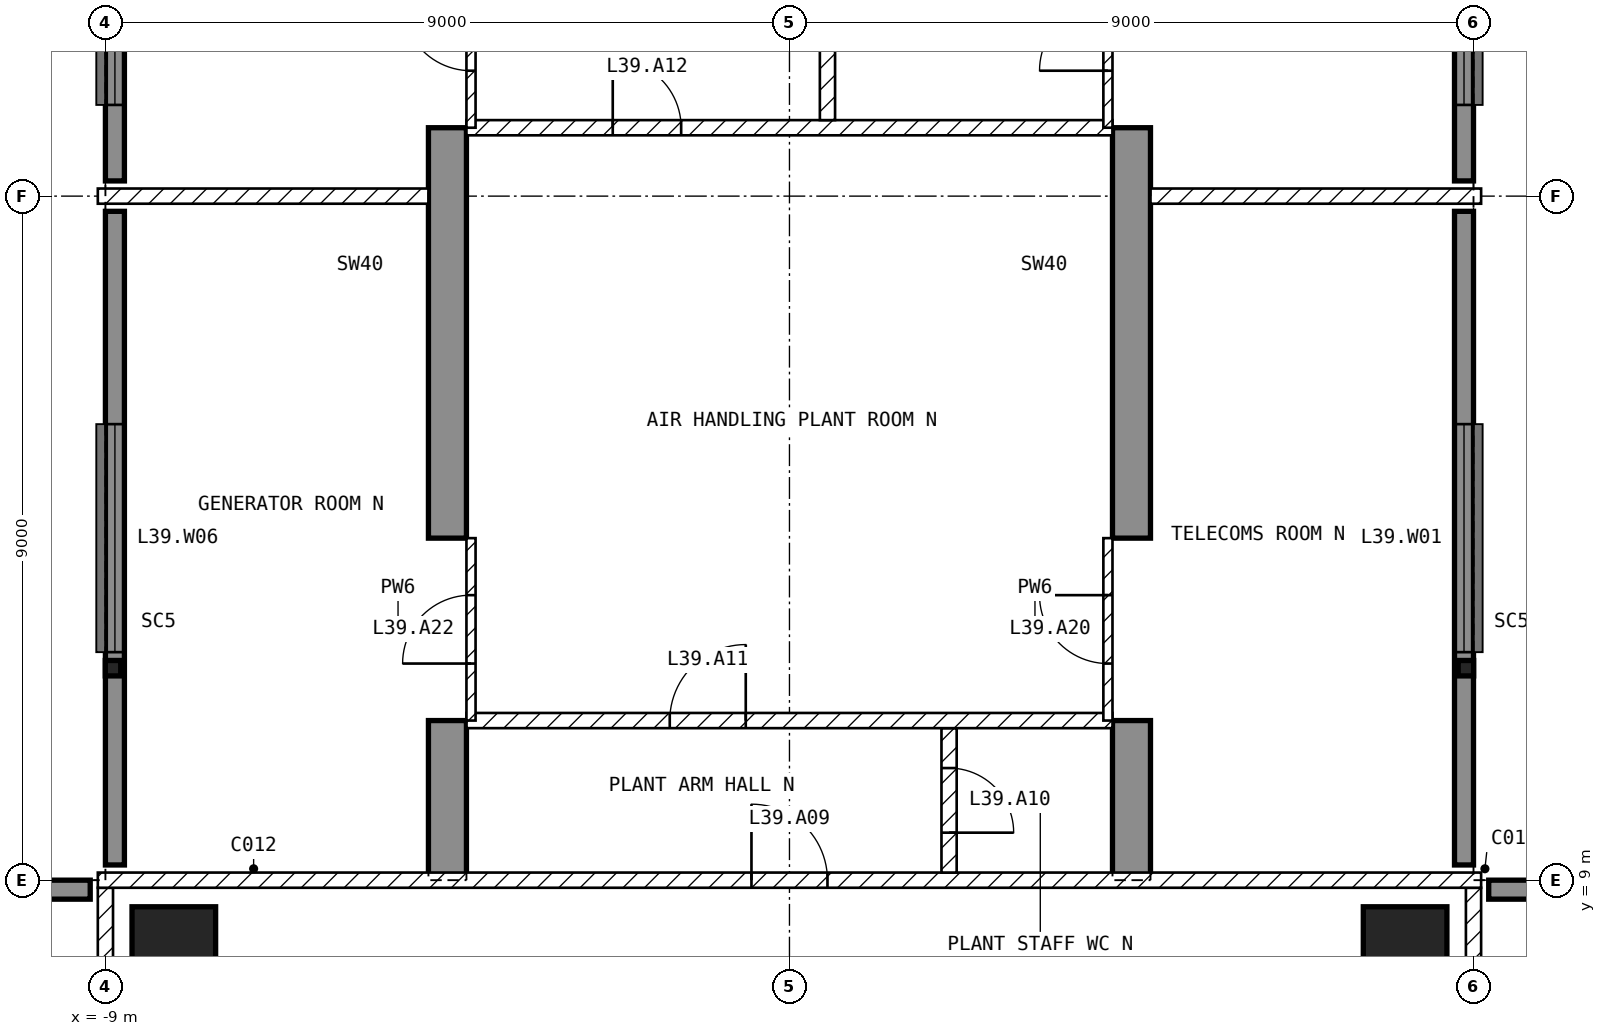
"""IFC4 building model, lengths in metres.
Left out: names, types, materials, properties, quantities, classifications, styles, units other than length and angle.
Written with IfcOpenShell. Run it as: python <this file> out.ifc"""

import sys

from ifc_helpers import new_model, si_unit, direction, frame, frame_2d, origin, origin_2d, place, context, subcontext, project, spatial, polyline, rectangle, hollow_rectangle, outline, extrude, element, fill, save


model = new_model("IFC4")
c1 = context("Model", 3, precision=1e-05, world=origin(), true_north=direction((0.0, 1.0)))
c2 = subcontext(c1, "Body", "Model", "MODEL_VIEW")
j1 = project(units=[si_unit("LENGTHUNIT", "METRE"), si_unit("PLANEANGLEUNIT", "RADIAN")], contexts=[c1])
p1 = place(None, origin())
s1 = spatial("IfcSite", under=j1, at=p1, CompositionType="ELEMENT")
p2 = place(p1, origin())
s2 = spatial("IfcBuilding", under=s1, at=p2, CompositionType="ELEMENT")
p3 = place(p2, frame((0.0, 0.0, 162.1)))
s3 = spatial("IfcBuildingStorey", under=s2, at=p3, CompositionType="ELEMENT", Elevation=162.1)
for number, where, z_axis, x_axis in (
    (1, (-8.1, 8.1, -0.45), (0.0, 0.0, 1.0), (1.0, 0.0, 0.0)),
    (2, (8.1, 8.1, -0.45), (0.0, 0.0, 1.0), (1.0, 0.0, 0.0)),
):
    element("IfcColumn", number, at=place(p3, frame(where, z_axis=z_axis, x_axis=x_axis)), inside=s3, PredefinedType="COLUMN", context=c2, shape_type="SweptSolid", body=[
        extrude(rectangle(XDim=1.1, YDim=1.1, at=origin_2d()), origin(), (0.0, 0.0, 1.0), 4.7),
    ])
for number, where, z_axis, x_axis in (
    (3, (-4.75, 9.0, -0.45), (1.0, 0.0, 0.0), (0.0, 1.0, 0.0)),
    (4, (4.25, 9.0, -0.45), (1.0, 0.0, 0.0), (0.0, 1.0, 0.0)),
):
    element("IfcWall", number, at=place(p3, frame(where, z_axis=z_axis, x_axis=x_axis)), inside=s3, PredefinedType="SHEAR", context=c2, shape_type="SweptSolid", body=[
        extrude(outline(polyline([(0.0, 0.0), (2.1, 0.0), (2.1, 2.85), (4.5, 2.85), (4.5, 0.0), (9.9, 0.0), (9.9, 2.85), (12.3, 2.85), (12.3, 0.0), (16.2, 0.0), (16.2, 4.7), (0.0, 4.7), (0.0, 0.0)])), origin(), (0.0, 0.0, 1.0), 0.5),
    ])
p4 = place(p3, frame((17.8, 8.875, 0.0), z_axis=(0.0, 0.0, 1.0), x_axis=(-1.0, 0.0, 0.0)))
e5 = element("IfcWall", 5, at=p4, inside=s3, PredefinedType="SOLIDWALL", context=c2, shape_type="SweptSolid", body=[
    extrude(rectangle(XDim=8.6, YDim=0.25, at=frame_2d((4.3, 0.0))), origin(), (0.0, 0.0, 1.0), 4.25),
])
p5 = place(p3, frame((8.875, 9.2, 0.0), z_axis=(0.0, 0.0, 1.0), x_axis=(0.0, 1.0, 0.0)))
e6 = element("IfcWall", 6, at=p5, inside=s3, PredefinedType="SOLIDWALL", context=c2, shape_type="SweptSolid", body=[
    extrude(rectangle(XDim=8.6, YDim=0.25, at=frame_2d((4.3, 0.0))), origin(), (0.0, 0.0, 1.0), 4.25),
])
p6 = place(p5, frame((2.8, 0.0, 1.0)))
e7 = element("IfcOpeningElement", 7, at=p6, cuts=e6, PredefinedType="OPENING", context=c2, shape_type="SweptSolid", body=[
    extrude(rectangle(XDim=3.0, YDim=2.4, at=frame_2d((1.5, 1.2))), frame((0.0, 0.135, 0.0), z_axis=(0.0, -1.0, 0.0), x_axis=(1.0, 0.0, 0.0)), (0.0, 0.0, 1.0), 0.27),
])
p7 = place(p3, frame((8.875, 18.2, 0.0), z_axis=(0.0, 0.0, 1.0), x_axis=(0.0, 1.0, 0.0)))
e8 = element("IfcWall", 8, at=p7, inside=s3, PredefinedType="SOLIDWALL", context=c2, shape_type="SweptSolid", body=[
    extrude(rectangle(XDim=5.0, YDim=0.25, at=frame_2d((2.5, 0.0))), origin(), (0.0, 0.0, 1.0), 4.25),
])
p8 = place(p7, frame((1.0, 0.0, 1.0)))
e9 = element("IfcOpeningElement", 9, at=p8, cuts=e8, PredefinedType="OPENING", context=c2, shape_type="SweptSolid", body=[
    extrude(rectangle(XDim=3.0, YDim=2.4, at=frame_2d((1.5, 1.2))), frame((0.0, 0.135, 0.0), z_axis=(0.0, -1.0, 0.0), x_axis=(1.0, 0.0, 0.0)), (0.0, 0.0, 1.0), 0.27),
])
p9 = place(p3, frame((-8.875, 23.2, 0.0), z_axis=(0.0, 0.0, 1.0), x_axis=(0.0, -1.0, 0.0)))
e10 = element("IfcWall", 10, at=p9, inside=s3, PredefinedType="SOLIDWALL", context=c2, shape_type="SweptSolid", body=[
    extrude(rectangle(XDim=5.0, YDim=0.25, at=frame_2d((2.5, 0.0))), origin(), (0.0, 0.0, 1.0), 4.25),
])
p10 = place(p9, frame((1.0, 0.0, 1.0)))
e11 = element("IfcOpeningElement", 11, at=p10, cuts=e10, PredefinedType="OPENING", context=c2, shape_type="SweptSolid", body=[
    extrude(rectangle(XDim=3.0, YDim=2.4, at=frame_2d((1.5, 1.2))), frame((0.0, 0.135, 0.0), z_axis=(0.0, -1.0, 0.0), x_axis=(1.0, 0.0, 0.0)), (0.0, 0.0, 1.0), 0.27),
])
p11 = place(p3, frame((-8.875, 17.8, 0.0), z_axis=(0.0, 0.0, 1.0), x_axis=(0.0, -1.0, 0.0)))
e12 = element("IfcWall", 12, at=p11, inside=s3, PredefinedType="SOLIDWALL", context=c2, shape_type="SweptSolid", body=[
    extrude(rectangle(XDim=8.6, YDim=0.25, at=frame_2d((4.3, 0.0))), origin(), (0.0, 0.0, 1.0), 4.25),
])
p12 = place(p11, frame((2.8, 0.0, 1.0)))
e13 = element("IfcOpeningElement", 13, at=p12, cuts=e12, PredefinedType="OPENING", context=c2, shape_type="SweptSolid", body=[
    extrude(rectangle(XDim=3.0, YDim=2.4, at=frame_2d((1.5, 1.2))), frame((0.0, 0.135, 0.0), z_axis=(0.0, -1.0, 0.0), x_axis=(1.0, 0.0, 0.0)), (0.0, 0.0, 1.0), 0.27),
])
p13 = place(p3, frame((-9.2, 8.875, 0.0), z_axis=(0.0, 0.0, 1.0), x_axis=(-1.0, 0.0, 0.0)))
e14 = element("IfcWall", 14, at=p13, inside=s3, PredefinedType="SOLIDWALL", context=c2, shape_type="SweptSolid", body=[
    extrude(rectangle(XDim=8.6, YDim=0.25, at=frame_2d((4.3, 0.0))), origin(), (0.0, 0.0, 1.0), 4.25),
])
for number, where, z_axis, x_axis in (
    (15, (-8.9, 11.789, 0.0), (0.0, 0.0, 1.0), (1.0, 0.0, 0.0)),
    (16, (8.9, 11.789, 0.0), (0.0, 0.0, 1.0), (1.0, 0.0, 0.0)),
):
    element("IfcColumn", number, at=place(p3, frame(where, z_axis=z_axis, x_axis=x_axis)), inside=s3, PredefinedType="COLUMN", context=c2, shape_type="SweptSolid", body=[
        extrude(hollow_rectangle(XDim=0.203, YDim=0.203, WallThickness=0.01, at=origin_2d()), origin(), (0.0, 0.0, 1.0), 4.25),
    ])
for number, where, z_axis, x_axis in (
    (17, (9.0, 8.9, 0.0), (0.0, 0.0, 1.0), (0.0, -1.0, 0.0)),
    (18, (-9.0, 1.3, 0.0), (0.0, 0.0, 1.0), (0.0, 1.0, 0.0)),
):
    element("IfcWall", number, at=place(p3, frame(where, z_axis=z_axis, x_axis=x_axis)), inside=s3, PredefinedType="PARTITIONING", context=c2, shape_type="SweptSolid", body=[
        extrude(rectangle(XDim=7.6, YDim=0.2, at=frame_2d((3.8, 0.0))), origin(), (0.0, 0.0, 1.0), 4.25),
    ])
p14 = place(p3, frame((-9.1, 9.0, 0.0), z_axis=(0.0, 0.0, 1.0), x_axis=(1.0, 0.0, 0.0)))
e19 = element("IfcWall", 19, at=p14, inside=s3, PredefinedType="PARTITIONING", context=c2, shape_type="SweptSolid", body=[
    extrude(rectangle(XDim=18.2, YDim=0.2, at=frame_2d((9.1, 0.0))), origin(), (0.0, 0.0, 1.0), 4.25),
])
p15 = place(p14, frame((8.6, 0.0, 0.0)))
e20 = element("IfcOpeningElement", 20, at=p15, cuts=e19, PredefinedType="OPENING", context=c2, shape_type="SweptSolid", body=[
    extrude(rectangle(XDim=1.0, YDim=2.1, at=frame_2d((0.5, 1.05))), frame((0.0, 0.11, 0.0), z_axis=(0.0, -1.0, 0.0), x_axis=(1.0, 0.0, 0.0)), (0.0, 0.0, 1.0), 0.22),
])
p16 = place(p3, frame((2.1, 11.0, 0.0), z_axis=(0.0, 0.0, 1.0), x_axis=(0.0, -1.0, 0.0)))
e21 = element("IfcWall", 21, at=p16, inside=s3, PredefinedType="PARTITIONING", context=c2, shape_type="SweptSolid", body=[
    extrude(rectangle(XDim=1.9, YDim=0.2, at=frame_2d((0.95, 0.0))), origin(), (0.0, 0.0, 1.0), 4.25),
])
p17 = place(p16, frame((0.525, 0.0, 0.0)))
e22 = element("IfcOpeningElement", 22, at=p17, cuts=e21, PredefinedType="OPENING", context=c2, shape_type="SweptSolid", body=[
    extrude(rectangle(XDim=0.85, YDim=2.1, at=frame_2d((0.425, 1.05))), frame((0.0, 0.11, 0.0), z_axis=(0.0, -1.0, 0.0), x_axis=(1.0, 0.0, 0.0)), (0.0, 0.0, 1.0), 0.22),
])
p18 = place(p3, frame((-4.25, 11.1, 0.0), z_axis=(0.0, 0.0, 1.0), x_axis=(1.0, 0.0, 0.0)))
e23 = element("IfcWall", 23, at=p18, inside=s3, PredefinedType="PARTITIONING", context=c2, shape_type="SweptSolid", body=[
    extrude(rectangle(XDim=8.5, YDim=0.2, at=frame_2d((4.25, 0.0))), origin(), (0.0, 0.0, 1.0), 4.25),
])
p19 = place(p18, frame((2.675, 0.0, 0.0)))
e24 = element("IfcOpeningElement", 24, at=p19, cuts=e23, PredefinedType="OPENING", context=c2, shape_type="SweptSolid", body=[
    extrude(rectangle(XDim=1.0, YDim=2.1, at=frame_2d((0.5, 1.05))), frame((0.0, 0.11, 0.0), z_axis=(0.0, -1.0, 0.0), x_axis=(1.0, 0.0, 0.0)), (0.0, 0.0, 1.0), 0.22),
])
p20 = place(p3, frame((-4.25, 18.9, 0.0), z_axis=(0.0, 0.0, 1.0), x_axis=(1.0, 0.0, 0.0)))
e25 = element("IfcWall", 25, at=p20, inside=s3, PredefinedType="PARTITIONING", context=c2, shape_type="SweptSolid", body=[
    extrude(rectangle(XDim=8.5, YDim=0.2, at=frame_2d((4.25, 0.0))), origin(), (0.0, 0.0, 1.0), 4.25),
])
p21 = place(p20, frame((1.925, 0.0, 0.0)))
e26 = element("IfcOpeningElement", 26, at=p21, cuts=e25, PredefinedType="OPENING", context=c2, shape_type="SweptSolid", body=[
    extrude(rectangle(XDim=0.9, YDim=2.1, at=frame_2d((0.45, 1.05))), frame((0.0, 0.11, 0.0), z_axis=(0.0, -1.0, 0.0), x_axis=(1.0, 0.0, 0.0)), (0.0, 0.0, 1.0), 0.22),
])
p22 = place(p3, frame((0.5, 23.3, 0.0), z_axis=(0.0, 0.0, 1.0), x_axis=(0.0, -1.0, 0.0)))
e27 = element("IfcWall", 27, at=p22, inside=s3, PredefinedType="PARTITIONING", context=c2, shape_type="SweptSolid", body=[
    extrude(rectangle(XDim=4.3, YDim=0.2, at=frame_2d((2.15, 0.0))), origin(), (0.0, 0.0, 1.0), 4.25),
])
p23 = place(p22, frame((1.7, 0.0, 0.0)))
e28 = element("IfcOpeningElement", 28, at=p23, cuts=e27, PredefinedType="OPENING", context=c2, shape_type="SweptSolid", body=[
    extrude(rectangle(XDim=0.9, YDim=2.1, at=frame_2d((0.45, 1.05))), frame((0.0, 0.11, 0.0), z_axis=(0.0, -1.0, 0.0), x_axis=(1.0, 0.0, 0.0)), (0.0, 0.0, 1.0), 0.22),
])
for number, where, z_axis, x_axis in (
    (29, (4.75, 18.0, 0.0), (0.0, 0.0, 1.0), (1.0, 0.0, 0.0)),
    (30, (-9.1, 18.0, 0.0), (0.0, 0.0, 1.0), (1.0, 0.0, 0.0)),
):
    element("IfcWall", number, at=place(p3, frame(where, z_axis=z_axis, x_axis=x_axis)), inside=s3, PredefinedType="PARTITIONING", context=c2, shape_type="SweptSolid", body=[
        extrude(rectangle(XDim=4.35, YDim=0.2, at=frame_2d((2.175, 0.0))), origin(), (0.0, 0.0, 1.0), 4.25),
    ])
p24 = place(p3, frame((4.19, 11.1, 0.0), z_axis=(0.0, 0.0, 1.0), x_axis=(0.0, 1.0, 0.0)))
e31 = element("IfcWall", 31, at=p24, inside=s3, PredefinedType="PARTITIONING", context=c2, shape_type="SweptSolid", body=[
    extrude(rectangle(XDim=2.4, YDim=0.12, at=frame_2d((1.2, 0.0))), origin(), (0.0, 0.0, 1.0), 2.4),
])
p25 = place(p24, frame((0.75, 0.0, 0.0)))
e32 = element("IfcOpeningElement", 32, at=p25, cuts=e31, PredefinedType="OPENING", context=c2, shape_type="SweptSolid", body=[
    extrude(rectangle(XDim=0.9, YDim=2.1, at=frame_2d((0.45, 1.05))), frame((0.0, 0.07, 0.0), z_axis=(0.0, -1.0, 0.0), x_axis=(1.0, 0.0, 0.0)), (0.0, 0.0, 1.0), 0.14),
])
p26 = place(p3, frame((4.19, 18.9, 0.0), z_axis=(0.0, 0.0, 1.0), x_axis=(0.0, 1.0, 0.0)))
e33 = element("IfcWall", 33, at=p26, inside=s3, PredefinedType="PARTITIONING", context=c2, shape_type="SweptSolid", body=[
    extrude(rectangle(XDim=2.4, YDim=0.12, at=frame_2d((1.2, 0.0))), origin(), (0.0, 0.0, 1.0), 2.4),
])
p27 = place(p26, frame((0.75, 0.0, 0.0)))
e34 = element("IfcOpeningElement", 34, at=p27, cuts=e33, PredefinedType="OPENING", context=c2, shape_type="SweptSolid", body=[
    extrude(rectangle(XDim=0.9, YDim=2.1, at=frame_2d((0.45, 1.05))), frame((0.0, 0.07, 0.0), z_axis=(0.0, -1.0, 0.0), x_axis=(1.0, 0.0, 0.0)), (0.0, 0.0, 1.0), 0.14),
])
p28 = place(p3, frame((-4.19, 11.1, 0.0), z_axis=(0.0, 0.0, 1.0), x_axis=(0.0, 1.0, 0.0)))
e35 = element("IfcWall", 35, at=p28, inside=s3, PredefinedType="PARTITIONING", context=c2, shape_type="SweptSolid", body=[
    extrude(rectangle(XDim=2.4, YDim=0.12, at=frame_2d((1.2, 0.0))), origin(), (0.0, 0.0, 1.0), 2.4),
])
p29 = place(p28, frame((0.75, 0.0, 0.0)))
e36 = element("IfcOpeningElement", 36, at=p29, cuts=e35, PredefinedType="OPENING", context=c2, shape_type="SweptSolid", body=[
    extrude(rectangle(XDim=0.9, YDim=2.1, at=frame_2d((0.45, 1.05))), frame((0.0, 0.07, 0.0), z_axis=(0.0, -1.0, 0.0), x_axis=(1.0, 0.0, 0.0)), (0.0, 0.0, 1.0), 0.14),
])
p30 = place(p3, frame((-4.19, 18.9, 0.0), z_axis=(0.0, 0.0, 1.0), x_axis=(0.0, 1.0, 0.0)))
e37 = element("IfcWall", 37, at=p30, inside=s3, PredefinedType="PARTITIONING", context=c2, shape_type="SweptSolid", body=[
    extrude(rectangle(XDim=2.4, YDim=0.12, at=frame_2d((1.2, 0.0))), origin(), (0.0, 0.0, 1.0), 2.4),
])
p31 = place(p30, frame((0.75, 0.0, 0.0)))
e38 = element("IfcOpeningElement", 38, at=p31, cuts=e37, PredefinedType="OPENING", context=c2, shape_type="SweptSolid", body=[
    extrude(rectangle(XDim=0.9, YDim=2.1, at=frame_2d((0.45, 1.05))), frame((0.0, 0.07, 0.0), z_axis=(0.0, -1.0, 0.0), x_axis=(1.0, 0.0, 0.0)), (0.0, 0.0, 1.0), 0.14),
])
p32 = place(p6, origin())
e39 = element("IfcWindow", 39, at=p32, inside=s3, PartitioningType="SINGLE_PANEL", PredefinedType="WINDOW", context=c2, shape_type="SweptSolid", body=[
    extrude(rectangle(XDim=3.0, YDim=2.4, at=frame_2d((1.5, 1.2))), frame((0.0, 0.03, 0.0), z_axis=(0.0, -1.0, 0.0), x_axis=(1.0, 0.0, 0.0)), (0.0, 0.0, 1.0), 0.06),
])
fill(e7, e39)
p33 = place(p8, origin())
e40 = element("IfcWindow", 40, at=p33, inside=s3, PartitioningType="SINGLE_PANEL", PredefinedType="WINDOW", context=c2, shape_type="SweptSolid", body=[
    extrude(rectangle(XDim=3.0, YDim=2.4, at=frame_2d((1.5, 1.2))), frame((0.0, 0.03, 0.0), z_axis=(0.0, -1.0, 0.0), x_axis=(1.0, 0.0, 0.0)), (0.0, 0.0, 1.0), 0.06),
])
fill(e9, e40)
p34 = place(p10, origin())
e41 = element("IfcWindow", 41, at=p34, inside=s3, PartitioningType="SINGLE_PANEL", PredefinedType="WINDOW", context=c2, shape_type="SweptSolid", body=[
    extrude(rectangle(XDim=3.0, YDim=2.4, at=frame_2d((1.5, 1.2))), frame((0.0, 0.03, 0.0), z_axis=(0.0, -1.0, 0.0), x_axis=(1.0, 0.0, 0.0)), (0.0, 0.0, 1.0), 0.06),
])
fill(e11, e41)
p35 = place(p12, origin())
e42 = element("IfcWindow", 42, at=p35, inside=s3, PartitioningType="SINGLE_PANEL", PredefinedType="WINDOW", context=c2, shape_type="SweptSolid", body=[
    extrude(rectangle(XDim=3.0, YDim=2.4, at=frame_2d((1.5, 1.2))), frame((0.0, 0.03, 0.0), z_axis=(0.0, -1.0, 0.0), x_axis=(1.0, 0.0, 0.0)), (0.0, 0.0, 1.0), 0.06),
])
fill(e13, e42)
p36 = place(p15, origin())
e43 = element("IfcDoor", 43, at=p36, inside=s3, OperationType="SINGLE_SWING_LEFT", PredefinedType="DOOR", context=c2, shape_type="SweptSolid", body=[
    extrude(rectangle(XDim=1.0, YDim=2.1, at=frame_2d((0.5, 1.05))), frame((0.0, 0.025, 0.0), z_axis=(0.0, -1.0, 0.0), x_axis=(1.0, 0.0, 0.0)), (0.0, 0.0, 1.0), 0.05),
])
fill(e20, e43)
p37 = place(p17, origin())
e44 = element("IfcDoor", 44, at=p37, inside=s3, OperationType="SINGLE_SWING_RIGHT", PredefinedType="DOOR", context=c2, shape_type="SweptSolid", body=[
    extrude(rectangle(XDim=0.85, YDim=2.1, at=frame_2d((0.425, 1.05))), frame((0.0, 0.025, 0.0), z_axis=(0.0, -1.0, 0.0), x_axis=(1.0, 0.0, 0.0)), (0.0, 0.0, 1.0), 0.05),
])
fill(e22, e44)
p38 = place(p19, origin())
e45 = element("IfcDoor", 45, at=p38, inside=s3, OperationType="SINGLE_SWING_RIGHT", PredefinedType="DOOR", context=c2, shape_type="SweptSolid", body=[
    extrude(rectangle(XDim=1.0, YDim=2.1, at=frame_2d((0.5, 1.05))), frame((0.0, 0.025, 0.0), z_axis=(0.0, -1.0, 0.0), x_axis=(1.0, 0.0, 0.0)), (0.0, 0.0, 1.0), 0.05),
])
fill(e24, e45)
p39 = place(p21, origin())
e46 = element("IfcDoor", 46, at=p39, inside=s3, OperationType="SINGLE_SWING_LEFT", PredefinedType="DOOR", context=c2, shape_type="SweptSolid", body=[
    extrude(rectangle(XDim=0.9, YDim=2.1, at=frame_2d((0.45, 1.05))), frame((0.0, 0.025, 0.0), z_axis=(0.0, -1.0, 0.0), x_axis=(1.0, 0.0, 0.0)), (0.0, 0.0, 1.0), 0.05),
])
fill(e26, e46)
p40 = place(p25, origin())
e47 = element("IfcDoor", 47, at=p40, inside=s3, OperationType="SINGLE_SWING_RIGHT", PredefinedType="DOOR", context=c2, shape_type="SweptSolid", body=[
    extrude(rectangle(XDim=0.9, YDim=2.1, at=frame_2d((0.45, 1.05))), frame((0.0, 0.025, 0.0), z_axis=(0.0, -1.0, 0.0), x_axis=(1.0, 0.0, 0.0)), (0.0, 0.0, 1.0), 0.05),
])
fill(e32, e47)
p41 = place(p27, origin())
e48 = element("IfcDoor", 48, at=p41, inside=s3, OperationType="SINGLE_SWING_LEFT", PredefinedType="DOOR", context=c2, shape_type="SweptSolid", body=[
    extrude(rectangle(XDim=0.9, YDim=2.1, at=frame_2d((0.45, 1.05))), frame((0.0, 0.025, 0.0), z_axis=(0.0, -1.0, 0.0), x_axis=(1.0, 0.0, 0.0)), (0.0, 0.0, 1.0), 0.05),
])
fill(e34, e48)
p42 = place(p29, origin())
e49 = element("IfcDoor", 49, at=p42, inside=s3, OperationType="SINGLE_SWING_LEFT", PredefinedType="DOOR", context=c2, shape_type="SweptSolid", body=[
    extrude(rectangle(XDim=0.9, YDim=2.1, at=frame_2d((0.45, 1.05))), frame((0.0, 0.025, 0.0), z_axis=(0.0, -1.0, 0.0), x_axis=(1.0, 0.0, 0.0)), (0.0, 0.0, 1.0), 0.05),
])
fill(e36, e49)
p43 = place(p31, origin())
e50 = element("IfcDoor", 50, at=p43, inside=s3, OperationType="SINGLE_SWING_RIGHT", PredefinedType="DOOR", context=c2, shape_type="SweptSolid", body=[
    extrude(rectangle(XDim=0.9, YDim=2.1, at=frame_2d((0.45, 1.05))), frame((0.0, 0.025, 0.0), z_axis=(0.0, -1.0, 0.0), x_axis=(1.0, 0.0, 0.0)), (0.0, 0.0, 1.0), 0.05),
])
fill(e38, e50)
save(model, sys.argv[1])
